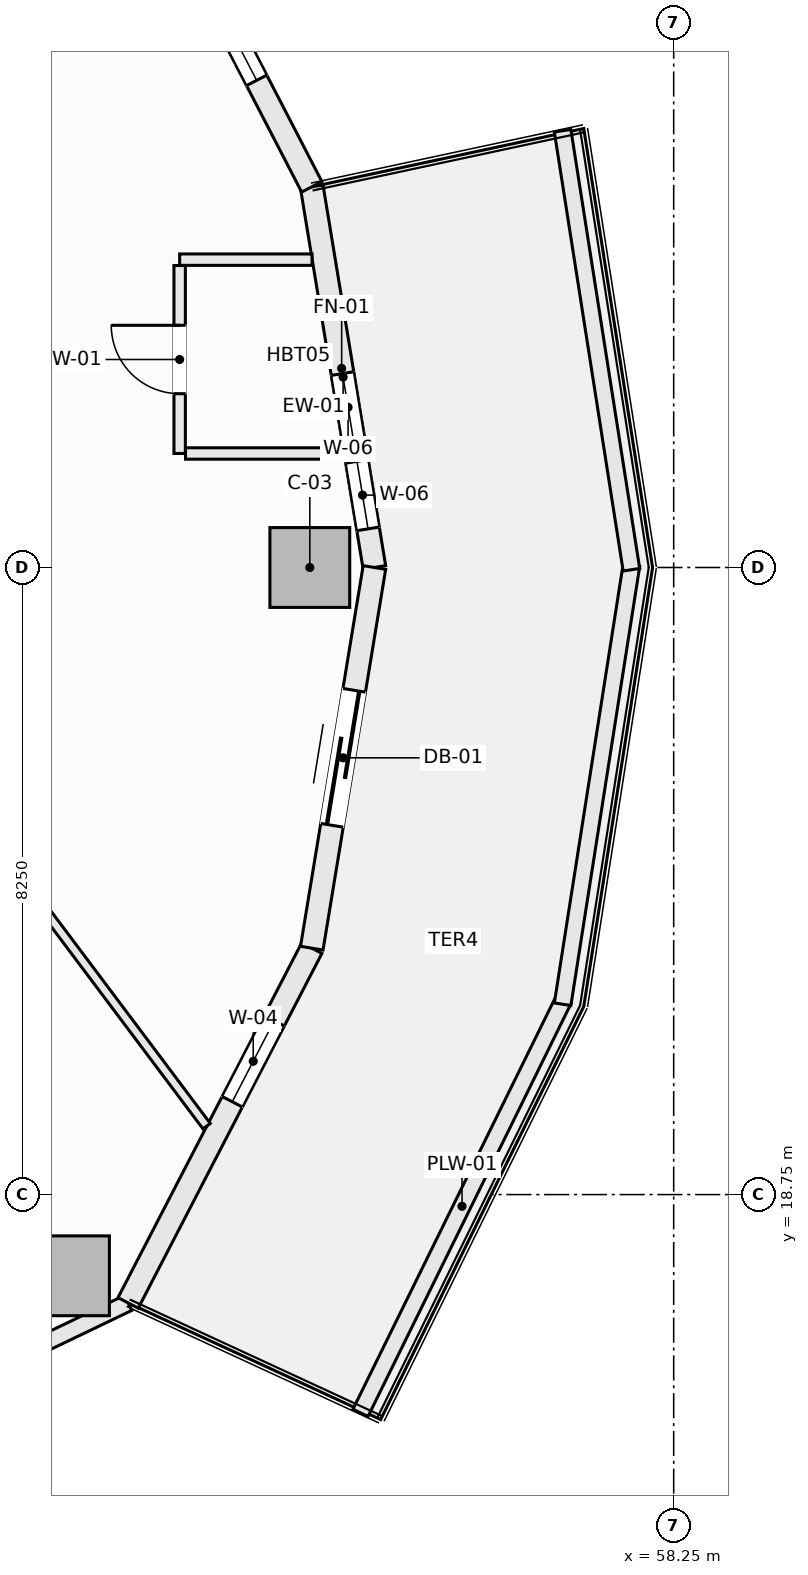
"""IFC4 building model, lengths in metres.
Left out: names, types, materials, properties, quantities, classifications, styles, units other than length and angle.
Written with IfcOpenShell. Run it as: python <this file> out.ifc"""

import sys

from ifc_helpers import new_model, si_unit, direction, frame, frame_2d, origin, origin_2d, place, context, subcontext, project, spatial, rectangle, extrude, element, fill, save


model = new_model("IFC4")
c1 = context("Model", 3, precision=1e-05, world=origin(), true_north=direction((0.0, 1.0)))
c2 = subcontext(c1, "Body", "Model", "MODEL_VIEW")
j1 = project(units=[si_unit("LENGTHUNIT", "METRE"), si_unit("PLANEANGLEUNIT", "RADIAN")], contexts=[c1])
p1 = place(None, origin())
s1 = spatial("IfcSite", under=j1, at=p1, CompositionType="ELEMENT")
p2 = place(p1, origin())
s2 = spatial("IfcBuilding", under=s1, at=p2, CompositionType="ELEMENT")
p3 = place(p2, frame((0.0, 0.0, 122.3)))
s3 = spatial("IfcBuildingStorey", under=s2, at=p3, CompositionType="ELEMENT", Elevation=122.3)
for number, where, z_axis, x_axis in (
    (1, (53.462, 27.0, -0.27), (0.0, 0.0, 1.0), (1.0, 0.0, 0.0)),
    (2, (50.3, 17.681, -0.27), (0.0, 0.0, 1.0), (1.0, 0.0, 0.0)),
):
    element("IfcColumn", number, at=place(p3, frame(where, z_axis=z_axis, x_axis=x_axis)), inside=s3, PredefinedType="COLUMN", context=c2, shape_type="SweptSolid", body=[
        extrude(rectangle(XDim=1.05, YDim=1.05, at=origin_2d()), origin(), (0.0, 0.0, 1.0), 3.4),
    ])
p4 = place(p3, frame((53.488, 32.008, 0.0), z_axis=(0.0, 0.0, 1.0), x_axis=(0.162393944769, -0.986726003864, 0.0)))
e3 = element("IfcWall", 3, at=p4, inside=s3, PredefinedType="SOLIDWALL", context=c2, shape_type="SweptSolid", body=[
    extrude(rectangle(XDim=5.075, YDim=0.3, at=frame_2d((2.538, 0.0))), origin(), (0.0, 0.0, 1.0), 2.653),
])
p5 = place(p4, frame((2.49, 0.0, 0.72)))
e4 = element("IfcOpeningElement", 4, at=p5, cuts=e3, PredefinedType="OPENING", context=c2, shape_type="SweptSolid", body=[
    extrude(rectangle(XDim=0.9, YDim=1.65, at=frame_2d((0.45, 0.825))), frame((0.0, 0.16, 0.0), z_axis=(0.0, -1.0, 0.0), x_axis=(1.0, 0.0, 0.0)), (0.0, 0.0, 1.0), 0.32),
])
p6 = place(p4, frame((3.66, 0.0, 0.72)))
e5 = element("IfcOpeningElement", 5, at=p6, cuts=e3, PredefinedType="OPENING", context=c2, shape_type="SweptSolid", body=[
    extrude(rectangle(XDim=0.9, YDim=1.65, at=frame_2d((0.45, 0.825))), frame((0.0, 0.16, 0.0), z_axis=(0.0, -1.0, 0.0), x_axis=(1.0, 0.0, 0.0)), (0.0, 0.0, 1.0), 0.32),
])
p7 = place(p3, frame((51.072, 36.675, 0.0), z_axis=(0.0, 0.0, 1.0), x_axis=(0.459767899643, -0.888039119892, 0.0)))
e6 = element("IfcWall", 6, at=p7, inside=s3, PredefinedType="SOLIDWALL", context=c2, shape_type="SweptSolid", body=[
    extrude(rectangle(XDim=5.255, YDim=0.3, at=frame_2d((2.628, 0.0))), origin(), (0.0, 0.0, 1.0), 2.653),
])
p8 = place(p7, frame((1.578, 0.0, 0.74)))
e7 = element("IfcOpeningElement", 7, at=p8, cuts=e6, PredefinedType="OPENING", context=c2, shape_type="SweptSolid", body=[
    extrude(rectangle(XDim=2.1, YDim=1.7, at=frame_2d((1.05, 0.85))), frame((0.0, 0.16, 0.0), z_axis=(0.0, -1.0, 0.0), x_axis=(1.0, 0.0, 0.0)), (0.0, 0.0, 1.0), 0.32),
])
p9 = place(p3, frame((50.007, 16.813, 0.0), z_axis=(0.0, 0.0, 1.0), x_axis=(0.90138115854, 0.433026566193, 0.0)))
e8 = element("IfcWall", 8, at=p9, inside=s3, PredefinedType="SOLIDWALL", context=c2, shape_type="SweptSolid", body=[
    extrude(rectangle(XDim=1.182, YDim=0.22, at=frame_2d((0.591, 0.0))), origin(), (0.0, 0.0, 1.0), 2.653),
])
p10 = place(p3, frame((51.072, 17.325, 0.0), z_axis=(0.0, 0.0, 1.0), x_axis=(0.459767899643, 0.888039119892, 0.0)))
e9 = element("IfcWall", 9, at=p10, inside=s3, PredefinedType="SOLIDWALL", context=c2, shape_type="SweptSolid", body=[
    extrude(rectangle(XDim=5.255, YDim=0.3, at=frame_2d((2.628, 0.0))), origin(), (0.0, 0.0, 1.0), 2.653),
])
p11 = place(p10, frame((2.98, 0.0, 0.72)))
e10 = element("IfcOpeningElement", 10, at=p11, cuts=e9, PredefinedType="OPENING", context=c2, shape_type="SweptSolid", body=[
    extrude(rectangle(XDim=1.2, YDim=1.65, at=frame_2d((0.6, 0.825))), frame((0.0, 0.16, 0.0), z_axis=(0.0, -1.0, 0.0), x_axis=(1.0, 0.0, 0.0)), (0.0, 0.0, 1.0), 0.32),
])
p12 = place(p3, frame((53.488, 21.992, 0.0), z_axis=(0.0, 0.0, 1.0), x_axis=(0.162393944769, 0.986726003864, 0.0)))
e11 = element("IfcWall", 11, at=p12, inside=s3, PredefinedType="SOLIDWALL", context=c2, shape_type="SweptSolid", body=[
    extrude(rectangle(XDim=5.075, YDim=0.3, at=frame_2d((2.538, 0.0))), origin(), (0.0, 0.0, 1.0), 2.653),
])
p13 = place(p12, frame((1.638, 0.0, 0.0)))
e12 = element("IfcOpeningElement", 12, at=p13, cuts=e11, PredefinedType="OPENING", context=c2, shape_type="SweptSolid", body=[
    extrude(rectangle(XDim=1.8, YDim=2.25, at=frame_2d((0.9, 1.125))), frame((0.0, 0.16, 0.0), z_axis=(0.0, -1.0, 0.0), x_axis=(1.0, 0.0, 0.0)), (0.0, 0.0, 1.0), 0.32),
])
p14 = place(p3, frame((54.129, 15.878, 0.0), z_axis=(0.0, 0.0, 1.0), x_axis=(0.441269631716, 0.897374566235, 0.0)))
e13 = element("IfcWall", 13, at=p14, inside=s3, PredefinedType="PARAPET", context=c2, shape_type="SweptSolid", body=[
    extrude(rectangle(XDim=6.056, YDim=0.22, at=frame_2d((3.028, 0.0))), origin(), (0.0, 0.0, 1.0), 0.52),
])
for number, where, z_axis, x_axis in (
    (14, (56.789, 21.254, 0.0), (0.0, 0.0, 1.0), (0.155, 0.988, 0.0)),
    (15, (56.789, 32.746, 0.0), (0.0, 0.0, 1.0), (0.155, -0.988, 0.0)),
):
    element("IfcWall", number, at=place(p3, frame(where, z_axis=z_axis, x_axis=x_axis)), inside=s3, PredefinedType="PARAPET", context=c2, shape_type="SweptSolid", body=[
        extrude(rectangle(XDim=5.846, YDim=0.22, at=frame_2d((2.923, 0.0))), origin(), (0.0, 0.0, 1.0), 0.52),
    ])
p15 = place(p3, frame((43.862, 30.635, 0.0), z_axis=(0.0, 0.0, 1.0), x_axis=(0.600213311992, -0.799839971561, 0.0)))
e16 = element("IfcWall", 16, at=p15, inside=s3, PredefinedType="PARTITIONING", context=c2, shape_type="SweptSolid", body=[
    extrude(rectangle(XDim=13.733, YDim=0.12, at=frame_2d((6.866, 0.0))), origin(), (0.0, 0.0, 1.0), 3.13),
])
p16 = place(p3, frame((51.75, 31.05, 0.0), z_axis=(0.0, 0.0, 1.0), x_axis=(1.0, 0.0, 0.0)))
e17 = element("IfcWall", 17, at=p16, inside=s3, PredefinedType="PARTITIONING", context=c2, shape_type="SweptSolid", body=[
    extrude(rectangle(XDim=1.742, YDim=0.15, at=frame_2d((0.871, 0.0))), origin(), (0.0, 0.0, 1.0), 3.13),
])
p17 = place(p3, frame((51.75, 28.5, 0.0), z_axis=(0.0, 0.0, 1.0), x_axis=(0.0, 1.0, 0.0)))
e18 = element("IfcWall", 18, at=p17, inside=s3, PredefinedType="PARTITIONING", context=c2, shape_type="SweptSolid", body=[
    extrude(rectangle(XDim=2.473, YDim=0.15, at=frame_2d((1.236, 0.0))), origin(), (0.0, 0.0, 1.0), 3.13),
])
p18 = place(p17, frame((0.787, 0.0, 0.0)))
e19 = element("IfcOpeningElement", 19, at=p18, cuts=e18, PredefinedType="OPENING", context=c2, shape_type="SweptSolid", body=[
    extrude(rectangle(XDim=0.9, YDim=2.1, at=frame_2d((0.45, 1.05))), frame((0.0, 0.085, 0.0), z_axis=(0.0, -1.0, 0.0), x_axis=(1.0, 0.0, 0.0)), (0.0, 0.0, 1.0), 0.17),
])
p19 = place(p3, frame((51.827, 28.5, 0.0), z_axis=(0.0, 0.0, 1.0), x_axis=(1.0, 0.0, 0.0)))
e20 = element("IfcWall", 20, at=p19, inside=s3, PredefinedType="PARTITIONING", context=c2, shape_type="SweptSolid", body=[
    extrude(rectangle(XDim=2.085, YDim=0.15, at=frame_2d((1.042, 0.0))), origin(), (0.0, 0.0, 1.0), 3.13),
])
p20 = place(p5, origin())
e21 = element("IfcWindow", 21, at=p20, inside=s3, PartitioningType="SINGLE_PANEL", PredefinedType="WINDOW", context=c2, shape_type="SweptSolid", body=[
    extrude(rectangle(XDim=0.9, YDim=1.65, at=frame_2d((0.45, 0.825))), frame((0.0, 0.03, 0.0), z_axis=(0.0, -1.0, 0.0), x_axis=(1.0, 0.0, 0.0)), (0.0, 0.0, 1.0), 0.06),
])
fill(e4, e21)
p21 = place(p8, origin())
e22 = element("IfcWindow", 22, at=p21, inside=s3, PartitioningType="SINGLE_PANEL", PredefinedType="WINDOW", context=c2, shape_type="SweptSolid", body=[
    extrude(rectangle(XDim=2.1, YDim=1.7, at=frame_2d((1.05, 0.85))), frame((0.0, 0.03, 0.0), z_axis=(0.0, -1.0, 0.0), x_axis=(1.0, 0.0, 0.0)), (0.0, 0.0, 1.0), 0.06),
])
fill(e7, e22)
p22 = place(p11, origin())
e23 = element("IfcWindow", 23, at=p22, inside=s3, PartitioningType="SINGLE_PANEL", PredefinedType="WINDOW", context=c2, shape_type="SweptSolid", body=[
    extrude(rectangle(XDim=1.2, YDim=1.65, at=frame_2d((0.6, 0.825))), frame((0.0, 0.03, 0.0), z_axis=(0.0, -1.0, 0.0), x_axis=(1.0, 0.0, 0.0)), (0.0, 0.0, 1.0), 0.06),
])
fill(e10, e23)
p23 = place(p13, frame((1.8, 0.0, 0.0), z_axis=(0.0, 0.0, 1.0), x_axis=(-1.0, 0.0, 0.0)))
e24 = element("IfcDoor", 24, at=p23, inside=s3, OperationType="SLIDING_TO_LEFT", PredefinedType="DOOR", context=c2, shape_type="SweptSolid", body=[
    extrude(rectangle(XDim=1.8, YDim=2.25, at=frame_2d((0.9, 1.125))), frame((0.0, 0.025, 0.0), z_axis=(0.0, -1.0, 0.0), x_axis=(1.0, 0.0, 0.0)), (0.0, 0.0, 1.0), 0.05),
])
fill(e12, e24)
p24 = place(p18, origin())
e25 = element("IfcDoor", 25, at=p24, inside=s3, OperationType="SINGLE_SWING_RIGHT", PredefinedType="DOOR", context=c2, shape_type="SweptSolid", body=[
    extrude(rectangle(XDim=0.9, YDim=2.1, at=frame_2d((0.45, 1.05))), frame((0.0, 0.025, 0.0), z_axis=(0.0, -1.0, 0.0), x_axis=(1.0, 0.0, 0.0)), (0.0, 0.0, 1.0), 0.05),
])
fill(e19, e25)
p25 = place(p6, origin())
e26 = element("IfcWindow", 26, at=p25, inside=s3, PartitioningType="SINGLE_PANEL", PredefinedType="WINDOW", context=c2, shape_type="SweptSolid", body=[
    extrude(rectangle(XDim=0.9, YDim=1.65, at=frame_2d((0.45, 0.825))), frame((0.0, 0.03, 0.0), z_axis=(0.0, -1.0, 0.0), x_axis=(1.0, 0.0, 0.0)), (0.0, 0.0, 1.0), 0.06),
])
fill(e5, e26)
save(model, sys.argv[1])
